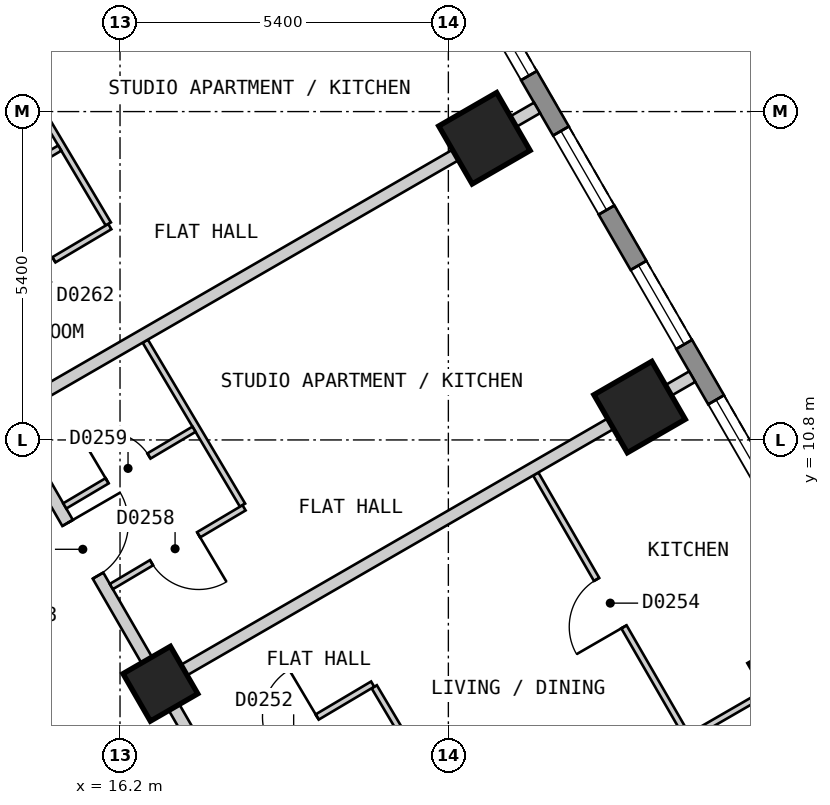
"""IFC4 building model, lengths in metres.
Left out: names, types, materials, properties, quantities, classifications, styles, units other than length and angle.
Written with IfcOpenShell. Run it as: python <this file> out.ifc"""

import sys

from ifc_helpers import new_model, si_unit, direction, frame, frame_2d, origin, origin_2d, place, context, subcontext, project, spatial, polyline, rectangle, outline, extrude, element, fill, save


model = new_model("IFC4")
c1 = context("Model", 3, precision=1e-05, world=origin(), true_north=direction((0.0, 1.0)))
c2 = subcontext(c1, "Body", "Model", "MODEL_VIEW")
j1 = project(units=[si_unit("LENGTHUNIT", "METRE"), si_unit("PLANEANGLEUNIT", "RADIAN")], contexts=[c1])
p1 = place(None, origin())
s1 = spatial("IfcSite", under=j1, at=p1, CompositionType="ELEMENT")
p2 = place(p1, origin())
s2 = spatial("IfcBuilding", under=s1, at=p2, CompositionType="ELEMENT")
p3 = place(p2, frame((0.0, 0.0, 47.4)))
s3 = spatial("IfcBuildingStorey", under=s2, at=p3, CompositionType="ELEMENT", Elevation=47.4)
for number, where, z_axis, x_axis in (
    (1, (27.297, 6.921, 0.0), (0.0, 0.0, 1.0), (-0.5, 0.866, 0.0)),
    (2, (24.745, 11.341, 0.0), (0.0, 0.0, 1.0), (-0.5, 0.866, 0.0)),
    (3, (22.193, 15.761, 0.0), (0.0, 0.0, 1.0), (-0.5, 0.866, 0.0)),
):
    element("IfcColumn", number, at=place(p3, frame(where, z_axis=z_axis, x_axis=x_axis)), inside=s3, PredefinedType="COLUMN", context=c2, shape_type="SweptSolid", body=[
        extrude(rectangle(XDim=1.1, YDim=1.1, at=origin_2d()), origin(), (0.0, 0.0, 1.0), 3.0),
    ])
p4 = place(p3, frame((16.864, 6.791, 0.0), z_axis=(0.0, 0.0, 1.0), x_axis=(-0.499984884929, 0.866034130299, 0.0)))
e4 = element("IfcColumn", 4, at=p4, inside=s3, PredefinedType="COLUMN", context=c2, shape_type="SweptSolid", body=[
    extrude(rectangle(XDim=0.9, YDim=0.9, at=origin_2d()), origin(), (0.0, 0.0, 1.0), 3.0),
])
p5 = place(p3, frame((31.22, 2.425, 0.0), z_axis=(0.0, 0.0, 1.0), x_axis=(-0.500001938803, 0.866024284413, 0.0)))
e5 = element("IfcWall", 5, at=p5, inside=s3, PredefinedType="SOLIDWALL", context=c2, shape_type="SweptSolid", body=[
    extrude(outline(polyline([(0.0, -0.15), (27.02, -0.15), (26.94, 0.15), (0.08, 0.15), (0.0, -0.15)])), origin(), (0.0, 0.0, 1.0), 2.7),
])
p6 = place(p5, frame((1.277, 0.0, 0.15)))
e6 = element("IfcOpeningElement", 6, at=p6, cuts=e5, PredefinedType="OPENING", context=c2, shape_type="SweptSolid", body=[
    extrude(rectangle(XDim=1.5, YDim=2.1, at=frame_2d((0.75, 1.05))), frame((0.0, 0.16, 0.0), z_axis=(0.0, -1.0, 0.0), x_axis=(1.0, 0.0, 0.0)), (0.0, 0.0, 1.0), 0.32),
])
p7 = place(p5, frame((3.829, 0.0, 0.15)))
e7 = element("IfcOpeningElement", 7, at=p7, cuts=e5, PredefinedType="OPENING", context=c2, shape_type="SweptSolid", body=[
    extrude(rectangle(XDim=1.5, YDim=2.1, at=frame_2d((0.75, 1.05))), frame((0.0, 0.16, 0.0), z_axis=(0.0, -1.0, 0.0), x_axis=(1.0, 0.0, 0.0)), (0.0, 0.0, 1.0), 0.32),
])
p8 = place(p5, frame((6.382, 0.0, 0.15)))
e8 = element("IfcOpeningElement", 8, at=p8, cuts=e5, PredefinedType="OPENING", context=c2, shape_type="SweptSolid", body=[
    extrude(rectangle(XDim=1.5, YDim=2.1, at=frame_2d((0.75, 1.05))), frame((0.0, 0.16, 0.0), z_axis=(0.0, -1.0, 0.0), x_axis=(1.0, 0.0, 0.0)), (0.0, 0.0, 1.0), 0.32),
])
p9 = place(p5, frame((8.933, 0.0, 0.15)))
e9 = element("IfcOpeningElement", 9, at=p9, cuts=e5, PredefinedType="OPENING", context=c2, shape_type="SweptSolid", body=[
    extrude(rectangle(XDim=1.5, YDim=2.1, at=frame_2d((0.75, 1.05))), frame((0.0, 0.16, 0.0), z_axis=(0.0, -1.0, 0.0), x_axis=(1.0, 0.0, 0.0)), (0.0, 0.0, 1.0), 0.32),
])
p10 = place(p5, frame((11.485, 0.0, 0.15)))
e10 = element("IfcOpeningElement", 10, at=p10, cuts=e5, PredefinedType="OPENING", context=c2, shape_type="SweptSolid", body=[
    extrude(rectangle(XDim=1.5, YDim=2.1, at=frame_2d((0.75, 1.05))), frame((0.0, 0.16, 0.0), z_axis=(0.0, -1.0, 0.0), x_axis=(1.0, 0.0, 0.0)), (0.0, 0.0, 1.0), 0.32),
])
p11 = place(p5, frame((14.037, 0.0, 0.15)))
e11 = element("IfcOpeningElement", 11, at=p11, cuts=e5, PredefinedType="OPENING", context=c2, shape_type="SweptSolid", body=[
    extrude(rectangle(XDim=1.5, YDim=2.1, at=frame_2d((0.75, 1.05))), frame((0.0, 0.16, 0.0), z_axis=(0.0, -1.0, 0.0), x_axis=(1.0, 0.0, 0.0)), (0.0, 0.0, 1.0), 0.32),
])
p12 = place(p5, frame((16.589, 0.0, 0.15)))
e12 = element("IfcOpeningElement", 12, at=p12, cuts=e5, PredefinedType="OPENING", context=c2, shape_type="SweptSolid", body=[
    extrude(rectangle(XDim=1.5, YDim=2.1, at=frame_2d((0.75, 1.05))), frame((0.0, 0.16, 0.0), z_axis=(0.0, -1.0, 0.0), x_axis=(1.0, 0.0, 0.0)), (0.0, 0.0, 1.0), 0.32),
])
p13 = place(p5, frame((19.141, 0.0, 0.15)))
e13 = element("IfcOpeningElement", 13, at=p13, cuts=e5, PredefinedType="OPENING", context=c2, shape_type="SweptSolid", body=[
    extrude(rectangle(XDim=1.5, YDim=2.1, at=frame_2d((0.75, 1.05))), frame((0.0, 0.16, 0.0), z_axis=(0.0, -1.0, 0.0), x_axis=(1.0, 0.0, 0.0)), (0.0, 0.0, 1.0), 0.32),
])
p14 = place(p5, frame((21.693, 0.0, 0.15)))
e14 = element("IfcOpeningElement", 14, at=p14, cuts=e5, PredefinedType="OPENING", context=c2, shape_type="SweptSolid", body=[
    extrude(rectangle(XDim=1.5, YDim=2.1, at=frame_2d((0.75, 1.05))), frame((0.0, 0.16, 0.0), z_axis=(0.0, -1.0, 0.0), x_axis=(1.0, 0.0, 0.0)), (0.0, 0.0, 1.0), 0.32),
])
p15 = place(p5, frame((24.244, 0.0, 0.15)))
e15 = element("IfcOpeningElement", 15, at=p15, cuts=e5, PredefinedType="OPENING", context=c2, shape_type="SweptSolid", body=[
    extrude(rectangle(XDim=1.5, YDim=2.1, at=frame_2d((0.75, 1.05))), frame((0.0, 0.16, 0.0), z_axis=(0.0, -1.0, 0.0), x_axis=(1.0, 0.0, 0.0)), (0.0, 0.0, 1.0), 0.32),
])
p16 = place(p3, frame((9.18, 15.7, 0.0), z_axis=(0.0, 0.0, 1.0), x_axis=(0.500003652032, -0.866023295272, 0.0)))
e16 = element("IfcWall", 16, at=p16, inside=s3, PredefinedType="PARTITIONING", context=c2, shape_type="SweptSolid", body=[
    extrude(rectangle(XDim=18.012, YDim=0.2, at=frame_2d((9.006, 0.0))), origin(), (0.0, 0.0, 1.0), 2.7),
])
p17 = place(p16, frame((8.556, 0.0, 0.0)))
e17 = element("IfcOpeningElement", 17, at=p17, cuts=e16, PredefinedType="OPENING", context=c2, shape_type="SweptSolid", body=[
    extrude(rectangle(XDim=0.9, YDim=2.1, at=frame_2d((0.45, 1.05))), frame((0.0, 0.11, 0.0), z_axis=(0.0, -1.0, 0.0), x_axis=(1.0, 0.0, 0.0)), (0.0, 0.0, 1.0), 0.22),
])
p18 = place(p3, frame((10.45, 17.9, 0.0), z_axis=(0.0, 0.0, 1.0), x_axis=(0.500034352617, -0.866005569383, 0.0)))
e18 = element("IfcWall", 18, at=p18, inside=s3, PredefinedType="PARTITIONING", context=c2, shape_type="SweptSolid", body=[
    extrude(rectangle(XDim=20.553, YDim=0.2, at=frame_2d((10.276, 0.0))), origin(), (0.0, 0.0, 1.0), 2.7),
])
p19 = place(p18, frame((14.879, 0.0, 0.0)))
e19 = element("IfcOpeningElement", 19, at=p19, cuts=e18, PredefinedType="OPENING", context=c2, shape_type="SweptSolid", body=[
    extrude(rectangle(XDim=1.0, YDim=2.1, at=frame_2d((0.5, 1.05))), frame((0.0, 0.11, 0.0), z_axis=(0.0, -1.0, 0.0), x_axis=(1.0, 0.0, 0.0)), (0.0, 0.0, 1.0), 0.22),
])
p20 = place(p18, frame((9.775, 0.0, 0.0)))
e20 = element("IfcOpeningElement", 20, at=p20, cuts=e18, PredefinedType="OPENING", context=c2, shape_type="SweptSolid", body=[
    extrude(rectangle(XDim=1.0, YDim=2.1, at=frame_2d((0.5, 1.05))), frame((0.0, 0.11, 0.0), z_axis=(0.0, -1.0, 0.0), x_axis=(1.0, 0.0, 0.0)), (0.0, 0.0, 1.0), 0.22),
])
p21 = place(p18, frame((4.671, 0.0, 0.0)))
e21 = element("IfcOpeningElement", 21, at=p21, cuts=e18, PredefinedType="OPENING", context=c2, shape_type="SweptSolid", body=[
    extrude(rectangle(XDim=1.0, YDim=2.1, at=frame_2d((0.5, 1.05))), frame((0.0, 0.11, 0.0), z_axis=(0.0, -1.0, 0.0), x_axis=(1.0, 0.0, 0.0)), (0.0, 0.0, 1.0), 0.22),
])
p22 = place(p3, frame((16.615, 12.425, 0.0), z_axis=(0.0, 0.0, 1.0), x_axis=(0.510241930604, -0.860030913546, 0.0)))
e22 = element("IfcWall", 22, at=p22, inside=s3, PredefinedType="PARTITIONING", context=c2, shape_type="SweptSolid", body=[
    extrude(rectangle(XDim=3.136, YDim=0.1, at=frame_2d((1.568, 0.0))), origin(), (0.0, 0.0, 1.0), 2.7),
])
p23 = place(p3, frame((20.381, 6.741, 0.0), z_axis=(0.0, 0.0, 1.0), x_axis=(0.510224755389, -0.860041103081, 0.0)))
e23 = element("IfcWall", 23, at=p23, inside=s3, PredefinedType="PARTITIONING", context=c2, shape_type="SweptSolid", body=[
    extrude(rectangle(XDim=3.216, YDim=0.1, at=frame_2d((1.608, 0.0))), origin(), (0.0, 0.0, 1.0), 2.7),
])
p24 = place(p3, frame((14.409, 17.045, 0.0), z_axis=(0.0, 0.0, 1.0), x_axis=(0.510362209222, -0.859959542884, 0.0)))
e24 = element("IfcWall", 24, at=p24, inside=s3, PredefinedType="PARTITIONING", context=c2, shape_type="SweptSolid", body=[
    extrude(rectangle(XDim=3.131, YDim=0.1, at=frame_2d((1.566, 0.0))), origin(), (0.0, 0.0, 1.0), 2.7),
])
p25 = place(p3, frame((23.037, 10.24, 0.0), z_axis=(0.0, 0.0, 1.0), x_axis=(0.499907296314, -0.866078919667, 0.0)))
e25 = element("IfcWall", 25, at=p25, inside=s3, PredefinedType="PARTITIONING", context=c2, shape_type="SweptSolid", body=[
    extrude(rectangle(XDim=4.955, YDim=0.1, at=frame_2d((2.477, 0.0))), origin(), (0.0, 0.0, 1.0), 2.7),
])
p26 = place(p25, frame((2.002, 0.0, 0.0)))
e26 = element("IfcOpeningElement", 26, at=p26, cuts=e25, PredefinedType="OPENING", context=c2, shape_type="SweptSolid", body=[
    extrude(rectangle(XDim=0.9, YDim=2.1, at=frame_2d((0.45, 1.05))), frame((0.0, 0.06, 0.0), z_axis=(0.0, -1.0, 0.0), x_axis=(1.0, 0.0, 0.0)), (0.0, 0.0, 1.0), 0.12),
])
p27 = place(p3, frame((19.503, 2.421, 0.0), z_axis=(0.0, 0.0, 1.0), x_axis=(0.866065245018, 0.499930986609, 0.0)))
e27 = element("IfcWall", 27, at=p27, inside=s3, PredefinedType="PARTITIONING", context=c2, shape_type="SweptSolid", body=[
    extrude(rectangle(XDim=10.0, YDim=0.1, at=frame_2d((5.0, 0.0))), origin(), (0.0, 0.0, 1.0), 2.7),
])
p28 = place(p27, frame((4.932, 0.0, 0.0)))
e28 = element("IfcOpeningElement", 28, at=p28, cuts=e27, PredefinedType="OPENING", context=c2, shape_type="SweptSolid", body=[
    extrude(rectangle(XDim=0.9, YDim=2.1, at=frame_2d((0.45, 1.05))), frame((0.0, 0.06, 0.0), z_axis=(0.0, -1.0, 0.0), x_axis=(1.0, 0.0, 0.0)), (0.0, 0.0, 1.0), 0.12),
])
p29 = place(p3, frame((17.843, 5.295, 0.0), z_axis=(0.0, 0.0, 1.0), x_axis=(0.860078277555, 0.510162088436, 0.0)))
e29 = element("IfcWall", 29, at=p29, inside=s3, PredefinedType="PARTITIONING", context=c2, shape_type="SweptSolid", body=[
    extrude(rectangle(XDim=2.921, YDim=0.1, at=frame_2d((1.46, 0.0))), origin(), (0.0, 0.0, 1.0), 2.7),
])
p30 = place(p29, frame((0.96, 0.0, 0.0)))
e30 = element("IfcOpeningElement", 30, at=p30, cuts=e29, PredefinedType="OPENING", context=c2, shape_type="SweptSolid", body=[
    extrude(rectangle(XDim=0.9, YDim=2.1, at=frame_2d((0.45, 1.05))), frame((0.0, 0.06, 0.0), z_axis=(0.0, -1.0, 0.0), x_axis=(1.0, 0.0, 0.0)), (0.0, 0.0, 1.0), 0.12),
])
p31 = place(p3, frame((16.057, 8.389, 0.0), z_axis=(0.0, 0.0, 1.0), x_axis=(0.860036770423, 0.510232058499, 0.0)))
e31 = element("IfcWall", 31, at=p31, inside=s3, PredefinedType="PARTITIONING", context=c2, shape_type="SweptSolid", body=[
    extrude(rectangle(XDim=2.538, YDim=0.1, at=frame_2d((1.269, 0.0))), origin(), (0.0, 0.0, 1.0), 2.7),
])
p32 = place(p31, frame((0.769, 0.0, 0.0)))
e32 = element("IfcOpeningElement", 32, at=p32, cuts=e31, PredefinedType="OPENING", context=c2, shape_type="SweptSolid", body=[
    extrude(rectangle(XDim=0.9, YDim=2.1, at=frame_2d((0.45, 1.05))), frame((0.0, 0.06, 0.0), z_axis=(0.0, -1.0, 0.0), x_axis=(1.0, 0.0, 0.0)), (0.0, 0.0, 1.0), 0.12),
])
p33 = place(p3, frame((13.505, 12.809, 0.0), z_axis=(0.0, 0.0, 1.0), x_axis=(0.860070102739, 0.510175870043, 0.0)))
e33 = element("IfcWall", 33, at=p33, inside=s3, PredefinedType="PARTITIONING", context=c2, shape_type="SweptSolid", body=[
    extrude(rectangle(XDim=2.938, YDim=0.1, at=frame_2d((1.469, 0.0))), origin(), (0.0, 0.0, 1.0), 2.7),
])
p34 = place(p33, frame((0.969, 0.0, 0.0)))
e34 = element("IfcOpeningElement", 34, at=p34, cuts=e33, PredefinedType="OPENING", context=c2, shape_type="SweptSolid", body=[
    extrude(rectangle(XDim=0.9, YDim=2.1, at=frame_2d((0.45, 1.05))), frame((0.0, 0.06, 0.0), z_axis=(0.0, -1.0, 0.0), x_axis=(1.0, 0.0, 0.0)), (0.0, 0.0, 1.0), 0.12),
])
p35 = place(p3, frame((12.739, 14.135, 0.0), z_axis=(0.0, 0.0, 1.0), x_axis=(0.860077414703, 0.510163543109, 0.0)))
e35 = element("IfcWall", 35, at=p35, inside=s3, PredefinedType="PARTITIONING", context=c2, shape_type="SweptSolid", body=[
    extrude(rectangle(XDim=2.872, YDim=0.1, at=frame_2d((1.436, 0.0))), origin(), (0.0, 0.0, 1.0), 2.7),
])
p36 = place(p35, frame((1.01, 0.0, 0.0)))
e36 = element("IfcOpeningElement", 36, at=p36, cuts=e35, PredefinedType="OPENING", context=c2, shape_type="SweptSolid", body=[
    extrude(rectangle(XDim=0.8, YDim=2.1, at=frame_2d((0.4, 1.05))), frame((0.0, 0.06, 0.0), z_axis=(0.0, -1.0, 0.0), x_axis=(1.0, 0.0, 0.0)), (0.0, 0.0, 1.0), 0.12),
])
p37 = place(p3, frame((15.291, 9.715, 0.0), z_axis=(0.0, 0.0, 1.0), x_axis=(0.860087708271, 0.510146188932, 0.0)))
e37 = element("IfcWall", 37, at=p37, inside=s3, PredefinedType="PARTITIONING", context=c2, shape_type="SweptSolid", body=[
    extrude(rectangle(XDim=2.472, YDim=0.1, at=frame_2d((1.236, 0.0))), origin(), (0.0, 0.0, 1.0), 2.7),
])
p38 = place(p37, frame((0.81, 0.0, 0.0)))
e38 = element("IfcOpeningElement", 38, at=p38, cuts=e37, PredefinedType="OPENING", context=c2, shape_type="SweptSolid", body=[
    extrude(rectangle(XDim=0.8, YDim=2.1, at=frame_2d((0.4, 1.05))), frame((0.0, 0.06, 0.0), z_axis=(0.0, -1.0, 0.0), x_axis=(1.0, 0.0, 0.0)), (0.0, 0.0, 1.0), 0.12),
])
for number, where, z_axis, x_axis in (
    (39, (16.95, 6.841, 0.0), (0.0, 0.0, 1.0), (0.866, 0.5, 0.0)),
    (40, (11.847, 15.681, 0.0), (0.0, 0.0, 1.0), (0.866, 0.5, 0.0)),
    (41, (14.399, 11.261, 0.0), (0.0, 0.0, 1.0), (0.866, 0.5, 0.0)),
):
    element("IfcWall", number, at=place(p3, frame(where, z_axis=z_axis, x_axis=x_axis)), inside=s3, PredefinedType="PARTITIONING", context=c2, shape_type="SweptSolid", body=[
        extrude(rectangle(XDim=10.0, YDim=0.2, at=frame_2d((5.0, 0.0))), origin(), (0.0, 0.0, 1.0), 2.7),
    ])
p39 = place(p9, origin())
e42 = element("IfcWindow", 42, at=p39, inside=s3, PartitioningType="SINGLE_PANEL", PredefinedType="WINDOW", context=c2, shape_type="SweptSolid", body=[
    extrude(rectangle(XDim=1.5, YDim=2.1, at=frame_2d((0.75, 1.05))), frame((0.0, 0.03, 0.0), z_axis=(0.0, -1.0, 0.0), x_axis=(1.0, 0.0, 0.0)), (0.0, 0.0, 1.0), 0.06),
])
fill(e9, e42)
p40 = place(p10, origin())
e43 = element("IfcWindow", 43, at=p40, inside=s3, PartitioningType="SINGLE_PANEL", PredefinedType="WINDOW", context=c2, shape_type="SweptSolid", body=[
    extrude(rectangle(XDim=1.5, YDim=2.1, at=frame_2d((0.75, 1.05))), frame((0.0, 0.03, 0.0), z_axis=(0.0, -1.0, 0.0), x_axis=(1.0, 0.0, 0.0)), (0.0, 0.0, 1.0), 0.06),
])
fill(e10, e43)
p41 = place(p11, origin())
e44 = element("IfcWindow", 44, at=p41, inside=s3, PartitioningType="SINGLE_PANEL", PredefinedType="WINDOW", context=c2, shape_type="SweptSolid", body=[
    extrude(rectangle(XDim=1.5, YDim=2.1, at=frame_2d((0.75, 1.05))), frame((0.0, 0.03, 0.0), z_axis=(0.0, -1.0, 0.0), x_axis=(1.0, 0.0, 0.0)), (0.0, 0.0, 1.0), 0.06),
])
fill(e11, e44)
p42 = place(p12, origin())
e45 = element("IfcWindow", 45, at=p42, inside=s3, PartitioningType="SINGLE_PANEL", PredefinedType="WINDOW", context=c2, shape_type="SweptSolid", body=[
    extrude(rectangle(XDim=1.5, YDim=2.1, at=frame_2d((0.75, 1.05))), frame((0.0, 0.03, 0.0), z_axis=(0.0, -1.0, 0.0), x_axis=(1.0, 0.0, 0.0)), (0.0, 0.0, 1.0), 0.06),
])
fill(e12, e45)
p43 = place(p30, origin())
e46 = element("IfcDoor", 46, at=p43, inside=s3, OperationType="SINGLE_SWING_RIGHT", PredefinedType="DOOR", context=c2, shape_type="SweptSolid", body=[
    extrude(rectangle(XDim=0.9, YDim=2.1, at=frame_2d((0.45, 1.05))), frame((0.0, 0.025, 0.0), z_axis=(0.0, -1.0, 0.0), x_axis=(1.0, 0.0, 0.0)), (0.0, 0.0, 1.0), 0.05),
])
fill(e30, e46)
p44 = place(p26, origin())
e47 = element("IfcDoor", 47, at=p44, inside=s3, OperationType="SINGLE_SWING_RIGHT", PredefinedType="DOOR", context=c2, shape_type="SweptSolid", body=[
    extrude(rectangle(XDim=0.9, YDim=2.1, at=frame_2d((0.45, 1.05))), frame((0.0, 0.025, 0.0), z_axis=(0.0, -1.0, 0.0), x_axis=(1.0, 0.0, 0.0)), (0.0, 0.0, 1.0), 0.05),
])
fill(e26, e47)
p45 = place(p20, origin())
e48 = element("IfcDoor", 48, at=p45, inside=s3, OperationType="SINGLE_SWING_LEFT", PredefinedType="DOOR", context=c2, shape_type="SweptSolid", body=[
    extrude(rectangle(XDim=1.0, YDim=2.1, at=frame_2d((0.5, 1.05))), frame((0.0, 0.025, 0.0), z_axis=(0.0, -1.0, 0.0), x_axis=(1.0, 0.0, 0.0)), (0.0, 0.0, 1.0), 0.05),
])
fill(e20, e48)
p46 = place(p32, origin())
e49 = element("IfcDoor", 49, at=p46, inside=s3, OperationType="SINGLE_SWING_RIGHT", PredefinedType="DOOR", context=c2, shape_type="SweptSolid", body=[
    extrude(rectangle(XDim=0.9, YDim=2.1, at=frame_2d((0.45, 1.05))), frame((0.0, 0.025, 0.0), z_axis=(0.0, -1.0, 0.0), x_axis=(1.0, 0.0, 0.0)), (0.0, 0.0, 1.0), 0.05),
])
fill(e32, e49)
p47 = place(p38, origin())
e50 = element("IfcDoor", 50, at=p47, inside=s3, OperationType="SINGLE_SWING_LEFT", PredefinedType="DOOR", context=c2, shape_type="SweptSolid", body=[
    extrude(rectangle(XDim=0.8, YDim=2.1, at=frame_2d((0.4, 1.05))), frame((0.0, 0.025, 0.0), z_axis=(0.0, -1.0, 0.0), x_axis=(1.0, 0.0, 0.0)), (0.0, 0.0, 1.0), 0.05),
])
fill(e38, e50)
p48 = place(p34, origin())
e51 = element("IfcDoor", 51, at=p48, inside=s3, OperationType="SINGLE_SWING_LEFT", PredefinedType="DOOR", context=c2, shape_type="SweptSolid", body=[
    extrude(rectangle(XDim=0.9, YDim=2.1, at=frame_2d((0.45, 1.05))), frame((0.0, 0.025, 0.0), z_axis=(0.0, -1.0, 0.0), x_axis=(1.0, 0.0, 0.0)), (0.0, 0.0, 1.0), 0.05),
])
fill(e34, e51)
save(model, sys.argv[1])
